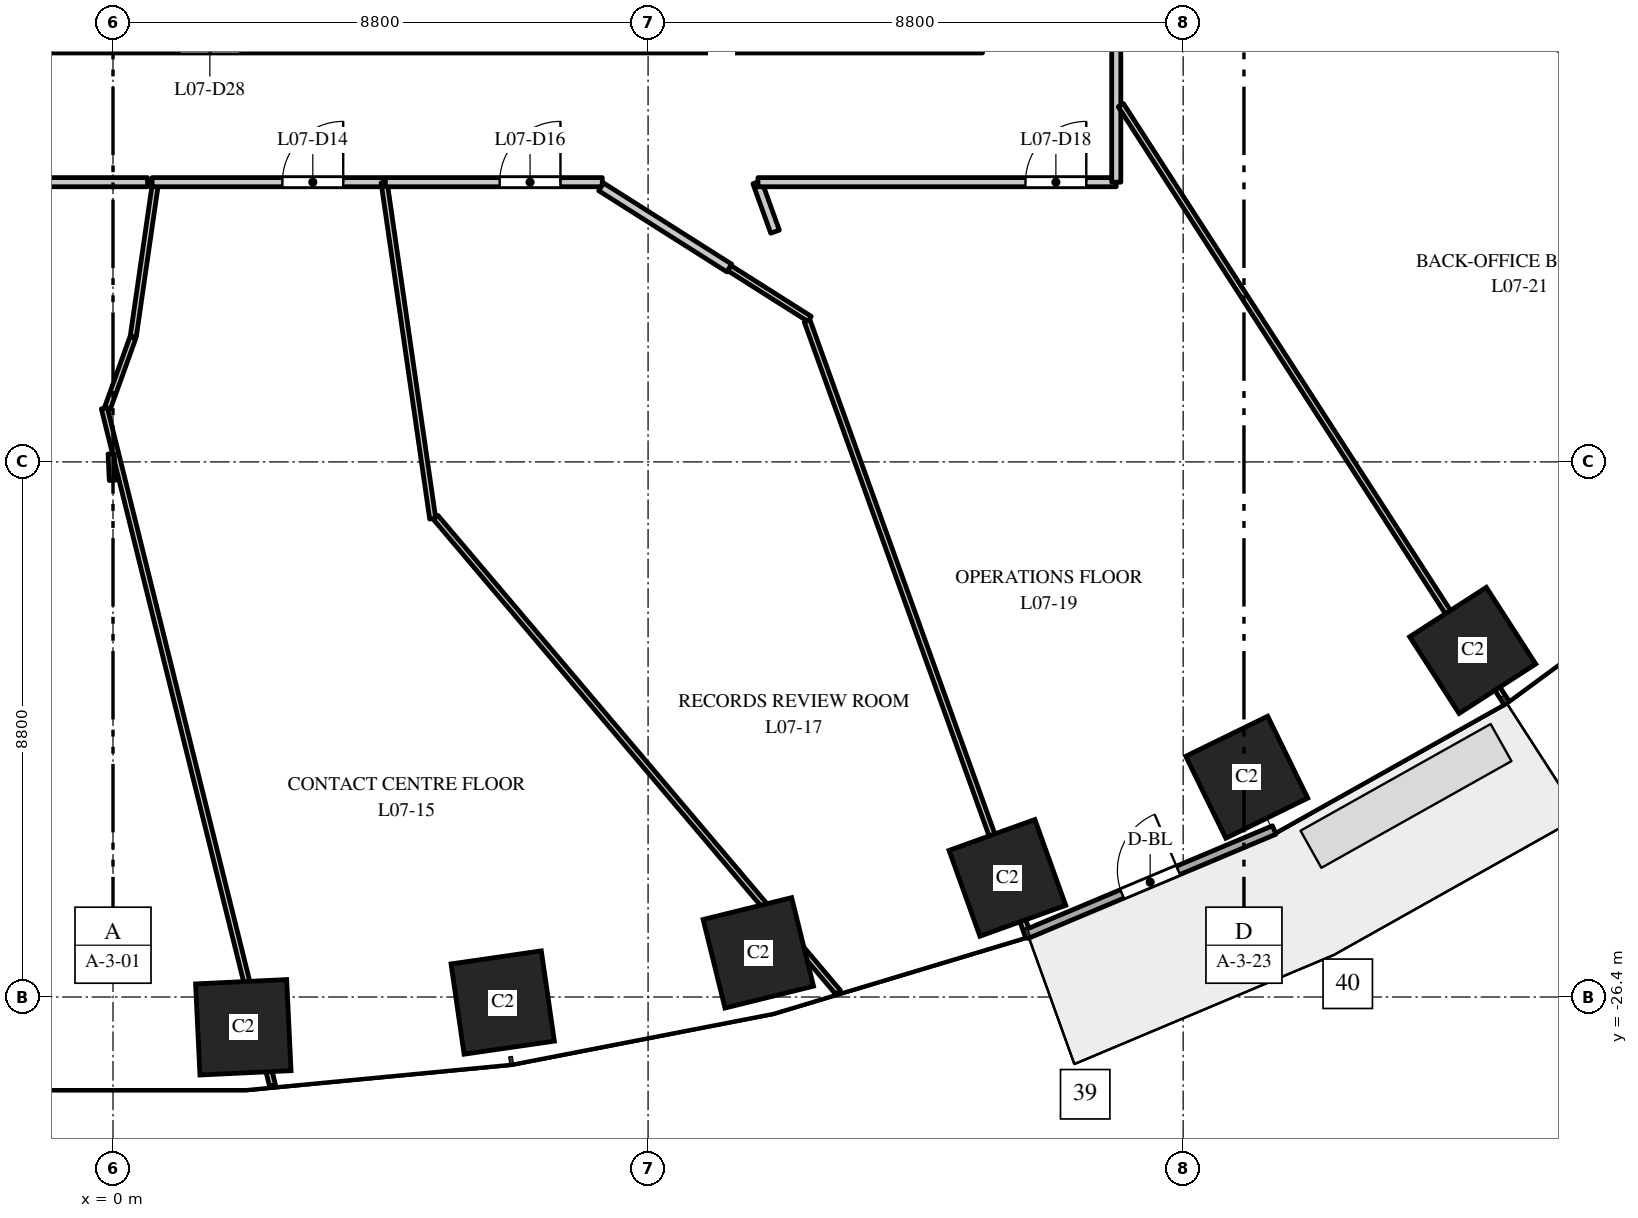
"""IFC4 building model, lengths in metres.
Left out: names, types, materials, properties, quantities, classifications, styles, units other than length and angle.
Written with IfcOpenShell. Run it as: python <this file> out.ifc"""

import sys

from ifc_helpers import new_model, si_unit, direction, frame, frame_2d, origin, origin_2d, place, context, subcontext, project, spatial, rectangle, extrude, element, fill, save


model = new_model("IFC4")
c1 = context("Model", 3, precision=1e-05, world=origin(), true_north=direction((0.0, 1.0)))
c2 = subcontext(c1, "Body", "Model", "MODEL_VIEW")
j1 = project(units=[si_unit("LENGTHUNIT", "METRE"), si_unit("PLANEANGLEUNIT", "RADIAN")], contexts=[c1])
p1 = place(None, origin())
s1 = spatial("IfcSite", under=j1, at=p1, CompositionType="ELEMENT")
p2 = place(p1, origin())
s2 = spatial("IfcBuilding", under=s1, at=p2, CompositionType="ELEMENT")
p3 = place(p2, frame((0.0, 0.0, 38.5)))
s3 = spatial("IfcBuildingStorey", under=s2, at=p3, CompositionType="ELEMENT", Elevation=38.5)
for number, where, z_axis, x_axis in (
    (1, (2.143, -26.898, 0.0), (0.0, 0.0, 1.0), (0.999, 0.048, 0.0)),
    (2, (6.409, -26.491, 0.0), (0.0, 0.0, 1.0), (0.99, 0.143, 0.0)),
    (3, (10.613, -25.674, 0.0), (0.0, 0.0, 1.0), (0.971, 0.24, 0.0)),
    (4, (14.709, -24.441, 0.0), (0.0, 0.0, 1.0), (0.941, 0.338, 0.0)),
    (5, (18.646, -22.785, 0.0), (0.0, 0.0, 1.0), (0.898, 0.439, 0.0)),
    (6, (22.362, -20.7, 0.0), (0.0, 0.0, 1.0), (0.84, 0.542, 0.0)),
):
    element("IfcColumn", number, at=place(p3, frame(where, z_axis=z_axis, x_axis=x_axis)), inside=s3, PredefinedType="COLUMN", context=c2, shape_type="SweptSolid", body=[
        extrude(rectangle(XDim=1.5, YDim=1.5, at=origin_2d()), origin(), (0.0, 0.0, 1.0), 4.0),
    ])
p4 = place(p3, frame((15.018, -25.369, 0.0), z_axis=(0.0, 0.0, 1.0), x_axis=(0.921816985161, 0.387625393736, 0.0)))
e7 = element("IfcWall", 7, at=p4, inside=s3, PredefinedType="STANDARD", context=c2, shape_type="SweptSolid", body=[
    extrude(rectangle(XDim=4.426, YDim=0.15, at=frame_2d((2.213, 0.0))), origin(), (0.0, 0.0, 1.0), 3.7),
])
p5 = place(p4, frame((1.713, 0.0, 0.0)))
e8 = element("IfcOpeningElement", 8, at=p5, cuts=e7, PredefinedType="OPENING", context=c2, shape_type="SweptSolid", body=[
    extrude(rectangle(XDim=1.0, YDim=2.4, at=frame_2d((0.5, 1.2))), frame((0.0, 0.085, 0.0), z_axis=(0.0, -1.0, 0.0), x_axis=(1.0, 0.0, 0.0)), (0.0, 0.0, 1.0), 0.17),
])
p6 = place(p3, frame((-14.3, -10.8, 0.0), z_axis=(0.0, 0.0, 1.0), x_axis=(1.0, 0.0, 0.0)))
e9 = element("IfcWall", 9, at=p6, inside=s3, PredefinedType="PARTITIONING", context=c2, shape_type="SweptSolid", body=[
    extrude(rectangle(XDim=28.6, YDim=0.15, at=frame_2d((14.3, 0.0))), origin(), (0.0, 0.0, 1.0), 2.85),
])
p7 = place(p6, frame((10.627, 0.0, 0.0)))
e10 = element("IfcOpeningElement", 10, at=p7, cuts=e9, PredefinedType="OPENING", context=c2, shape_type="SweptSolid", body=[
    extrude(rectangle(XDim=1.0, YDim=2.1, at=frame_2d((0.5, 1.05))), frame((0.0, 0.085, 0.0), z_axis=(0.0, -1.0, 0.0), x_axis=(1.0, 0.0, 0.0)), (0.0, 0.0, 1.0), 0.17),
])
p8 = place(p6, frame((15.393, 0.0, 0.0)))
e11 = element("IfcOpeningElement", 11, at=p8, cuts=e9, PredefinedType="OPENING", context=c2, shape_type="SweptSolid", body=[
    extrude(rectangle(XDim=1.0, YDim=2.1, at=frame_2d((0.5, 1.05))), frame((0.0, 0.085, 0.0), z_axis=(0.0, -1.0, 0.0), x_axis=(1.0, 0.0, 0.0)), (0.0, 0.0, 1.0), 0.17),
])
p9 = place(p3, frame((-7.483, -13.0, 0.0), z_axis=(0.0, 0.0, 1.0), x_axis=(1.0, 0.0, 0.0)))
e12 = element("IfcWall", 12, at=p9, inside=s3, PredefinedType="PARTITIONING", context=c2, shape_type="SweptSolid", body=[
    extrude(rectangle(XDim=8.051, YDim=0.15, at=frame_2d((4.025, 0.0))), origin(), (0.0, 0.0, 1.0), 2.85),
])
p10 = place(p9, frame((1.634, 0.0, 0.0)))
e13 = element("IfcOpeningElement", 13, at=p10, cuts=e12, PredefinedType="OPENING", context=c2, shape_type="SweptSolid", body=[
    extrude(rectangle(XDim=1.0, YDim=2.1, at=frame_2d((0.5, 1.05))), frame((0.0, 0.085, 0.0), z_axis=(0.0, -1.0, 0.0), x_axis=(1.0, 0.0, 0.0)), (0.0, 0.0, 1.0), 0.17),
])
p11 = place(p3, frame((-0.143, -16.716, 0.0), z_axis=(0.0, 0.0, 1.0), x_axis=(0.24100876492, -0.970522939055, 0.0)))
e14 = element("IfcWall", 14, at=p11, inside=s3, PredefinedType="PARTITIONING", context=c2, shape_type="SweptSolid", body=[
    extrude(rectangle(XDim=11.477, YDim=0.1, at=frame_2d((5.739, 0.0))), origin(), (0.0, 0.0, 1.0), 2.85),
])
p12 = place(p3, frame((-0.091, -16.717, 0.0), z_axis=(0.0, 0.0, 1.0), x_axis=(0.338558024313, 0.940945516049, 0.0)))
e15 = element("IfcWall", 15, at=p12, inside=s3, PredefinedType="PARTITIONING", context=c2, shape_type="SweptSolid", body=[
    extrude(rectangle(XDim=1.232, YDim=0.1, at=frame_2d((0.616, 0.0))), origin(), (0.0, 0.0, 1.0), 3.7),
])
p13 = place(p3, frame((-0.031, -17.468, 0.0), z_axis=(0.0, 0.0, 1.0), x_axis=(0.045864339057, -0.99894767751, 0.0)))
e16 = element("IfcWall", 16, at=p13, inside=s3, PredefinedType="PARTITIONING", context=c2, shape_type="SweptSolid", body=[
    extrude(rectangle(XDim=0.437, YDim=0.1, at=frame_2d((0.218, 0.0))), origin(), (0.0, 0.0, 1.0), 3.7),
])
p14 = place(p3, frame((0.333, -15.539, 0.0), z_axis=(0.0, 0.0, 1.0), x_axis=(0.143115891067, 0.989705936996, 0.0)))
e17 = element("IfcWall", 17, at=p14, inside=s3, PredefinedType="PARTITIONING", context=c2, shape_type="SweptSolid", body=[
    extrude(rectangle(XDim=2.501, YDim=0.1, at=frame_2d((1.25, 0.0))), origin(), (0.0, 0.0, 1.0), 3.7),
])
p15 = place(p3, frame((0.643, -13.0, 0.0), z_axis=(0.0, 0.0, 1.0), x_axis=(1.0, 0.0, 0.0)))
e18 = element("IfcWall", 18, at=p15, inside=s3, PredefinedType="PARTITIONING", context=c2, shape_type="SweptSolid", body=[
    extrude(rectangle(XDim=3.816, YDim=0.15, at=frame_2d((1.908, 0.0))), origin(), (0.0, 0.0, 1.0), 2.85),
])
p16 = place(p15, frame((2.143, 0.0, 0.0)))
e19 = element("IfcOpeningElement", 19, at=p16, cuts=e18, PredefinedType="OPENING", context=c2, shape_type="SweptSolid", body=[
    extrude(rectangle(XDim=1.0, YDim=2.1, at=frame_2d((0.5, 1.05))), frame((0.0, 0.085, 0.0), z_axis=(0.0, -1.0, 0.0), x_axis=(1.0, 0.0, 0.0)), (0.0, 0.0, 1.0), 0.17),
])
p17 = place(p3, frame((4.459, -13.004, 0.0), z_axis=(0.0, 0.0, 1.0), x_axis=(0.143036391033, -0.989717429795, 0.0)))
e20 = element("IfcWall", 20, at=p17, inside=s3, PredefinedType="PARTITIONING", context=c2, shape_type="SweptSolid", body=[
    extrude(rectangle(XDim=5.586, YDim=0.1, at=frame_2d((2.793, 0.0))), origin(), (0.0, 0.0, 1.0), 3.7),
])
p18 = place(p3, frame((4.479, -13.0, 0.0), z_axis=(0.0, 0.0, 1.0), x_axis=(1.0, 0.0, 0.0)))
e21 = element("IfcWall", 21, at=p18, inside=s3, PredefinedType="PARTITIONING", context=c2, shape_type="SweptSolid", body=[
    extrude(rectangle(XDim=3.568, YDim=0.15, at=frame_2d((1.784, 0.0))), origin(), (0.0, 0.0, 1.0), 2.85),
])
p19 = place(p18, frame((1.88, 0.0, 0.0)))
e22 = element("IfcOpeningElement", 22, at=p19, cuts=e21, PredefinedType="OPENING", context=c2, shape_type="SweptSolid", body=[
    extrude(rectangle(XDim=1.0, YDim=2.1, at=frame_2d((0.5, 1.05))), frame((0.0, 0.085, 0.0), z_axis=(0.0, -1.0, 0.0), x_axis=(1.0, 0.0, 0.0)), (0.0, 0.0, 1.0), 0.17),
])
p20 = place(p3, frame((5.306, -18.512, 0.0), z_axis=(0.0, 0.0, 1.0), x_axis=(0.646500054355, -0.762913939917, 0.0)))
e23 = element("IfcWall", 23, at=p20, inside=s3, PredefinedType="PARTITIONING", context=c2, shape_type="SweptSolid", body=[
    extrude(rectangle(XDim=10.239, YDim=0.1, at=frame_2d((5.119, 0.0))), origin(), (0.0, 0.0, 1.0), 2.85),
])
p21 = place(p3, frame((8.028, -13.077, 0.0), z_axis=(0.0, 0.0, 1.0), x_axis=(0.844718865656, -0.53521027457, 0.0)))
e24 = element("IfcWall", 24, at=p21, inside=s3, PredefinedType="PARTITIONING", context=c2, shape_type="SweptSolid", body=[
    extrude(rectangle(XDim=2.497, YDim=0.15, at=frame_2d((1.248, 0.0))), origin(), (0.0, 0.0, 1.0), 3.7),
])
p22 = place(p3, frame((10.137, -14.413, 0.0), z_axis=(0.0, 0.0, 1.0), x_axis=(0.844849680057, -0.535003755228, 0.0)))
e25 = element("IfcWall", 25, at=p22, inside=s3, PredefinedType="PARTITIONING", context=c2, shape_type="SweptSolid", body=[
    extrude(rectangle(XDim=1.562, YDim=0.1, at=frame_2d((0.781, 0.0))), origin(), (0.0, 0.0, 1.0), 3.7),
])
p23 = place(p3, frame((10.595, -13.0, 0.0), z_axis=(0.0, 0.0, 1.0), x_axis=(0.338659506624, -0.940908995904, 0.0)))
e26 = element("IfcWall", 26, at=p23, inside=s3, PredefinedType="PARTITIONING", context=c2, shape_type="SweptSolid", body=[
    extrude(rectangle(XDim=0.865, YDim=0.15, at=frame_2d((0.433, 0.0))), origin(), (0.0, 0.0, 1.0), 3.7),
])
p24 = place(p3, frame((10.607, -13.0, 0.0), z_axis=(0.0, 0.0, 1.0), x_axis=(1.0, 0.0, 0.0)))
e27 = element("IfcWall", 27, at=p24, inside=s3, PredefinedType="PARTITIONING", context=c2, shape_type="SweptSolid", body=[
    extrude(rectangle(XDim=5.893, YDim=0.15, at=frame_2d((2.947, 0.0))), origin(), (0.0, 0.0, 1.0), 3.7),
])
p25 = place(p24, frame((4.4, 0.0, 0.0)))
e28 = element("IfcOpeningElement", 28, at=p25, cuts=e27, PredefinedType="OPENING", context=c2, shape_type="SweptSolid", body=[
    extrude(rectangle(XDim=1.0, YDim=2.1, at=frame_2d((0.5, 1.05))), frame((0.0, 0.085, 0.0), z_axis=(0.0, -1.0, 0.0), x_axis=(1.0, 0.0, 0.0)), (0.0, 0.0, 1.0), 0.17),
])
p26 = place(p3, frame((11.416, -15.282, 0.0), z_axis=(0.0, 0.0, 1.0), x_axis=(0.338364268616, -0.94101520802, 0.0)))
e29 = element("IfcWall", 29, at=p26, inside=s3, PredefinedType="PARTITIONING", context=c2, shape_type="SweptSolid", body=[
    extrude(rectangle(XDim=10.734, YDim=0.1, at=frame_2d((5.367, 0.0))), origin(), (0.0, 0.0, 1.0), 3.7),
])
p27 = place(p3, frame((16.5, -13.0, 0.0), z_axis=(0.0, 0.0, 1.0), x_axis=(0.0, 1.0, 0.0)))
e30 = element("IfcWall", 30, at=p27, inside=s3, PredefinedType="PARTITIONING", context=c2, shape_type="SweptSolid", body=[
    extrude(rectangle(XDim=2.3, YDim=0.15, at=frame_2d((1.15, 0.0))), origin(), (0.0, 0.0, 1.0), 3.7),
])
p28 = place(p3, frame((16.575, -11.733, 0.0), z_axis=(0.0, 0.0, 1.0), x_axis=(0.54222594427, -0.840232720953, 0.0)))
e31 = element("IfcWall", 31, at=p28, inside=s3, PredefinedType="PARTITIONING", context=c2, shape_type="SweptSolid", body=[
    extrude(rectangle(XDim=11.674, YDim=0.1, at=frame_2d((5.837, 0.0))), origin(), (0.0, 0.0, 1.0), 3.7),
])
p29 = place(p3, frame((23.785, -10.778, 0.0), z_axis=(0.0, 0.0, 1.0), x_axis=(0.748985701008, -0.662586160198, 0.0)))
e32 = element("IfcWall", 32, at=p29, inside=s3, PredefinedType="PARTITIONING", context=c2, shape_type="SweptSolid", body=[
    extrude(rectangle(XDim=7.723, YDim=0.1, at=frame_2d((3.861, 0.0))), origin(), (0.0, 0.0, 1.0), 3.7),
])
p30 = place(p5, origin())
e33 = element("IfcDoor", 33, at=p30, inside=s3, OperationType="SINGLE_SWING_RIGHT", PredefinedType="DOOR", context=c2, shape_type="SweptSolid", body=[
    extrude(rectangle(XDim=1.0, YDim=2.4, at=frame_2d((0.5, 1.2))), frame((0.0, 0.025, 0.0), z_axis=(0.0, -1.0, 0.0), x_axis=(1.0, 0.0, 0.0)), (0.0, 0.0, 1.0), 0.05),
])
fill(e8, e33)
p31 = place(p16, origin())
e34 = element("IfcDoor", 34, at=p31, inside=s3, OperationType="SINGLE_SWING_RIGHT", PredefinedType="DOOR", context=c2, shape_type="SweptSolid", body=[
    extrude(rectangle(XDim=1.0, YDim=2.1, at=frame_2d((0.5, 1.05))), frame((0.0, 0.025, 0.0), z_axis=(0.0, -1.0, 0.0), x_axis=(1.0, 0.0, 0.0)), (0.0, 0.0, 1.0), 0.05),
])
fill(e19, e34)
p32 = place(p19, origin())
e35 = element("IfcDoor", 35, at=p32, inside=s3, OperationType="SINGLE_SWING_RIGHT", PredefinedType="DOOR", context=c2, shape_type="SweptSolid", body=[
    extrude(rectangle(XDim=1.0, YDim=2.1, at=frame_2d((0.5, 1.05))), frame((0.0, 0.025, 0.0), z_axis=(0.0, -1.0, 0.0), x_axis=(1.0, 0.0, 0.0)), (0.0, 0.0, 1.0), 0.05),
])
fill(e22, e35)
p33 = place(p25, origin())
e36 = element("IfcDoor", 36, at=p33, inside=s3, OperationType="SINGLE_SWING_RIGHT", PredefinedType="DOOR", context=c2, shape_type="SweptSolid", body=[
    extrude(rectangle(XDim=1.0, YDim=2.1, at=frame_2d((0.5, 1.05))), frame((0.0, 0.025, 0.0), z_axis=(0.0, -1.0, 0.0), x_axis=(1.0, 0.0, 0.0)), (0.0, 0.0, 1.0), 0.05),
])
fill(e28, e36)
save(model, sys.argv[1])
